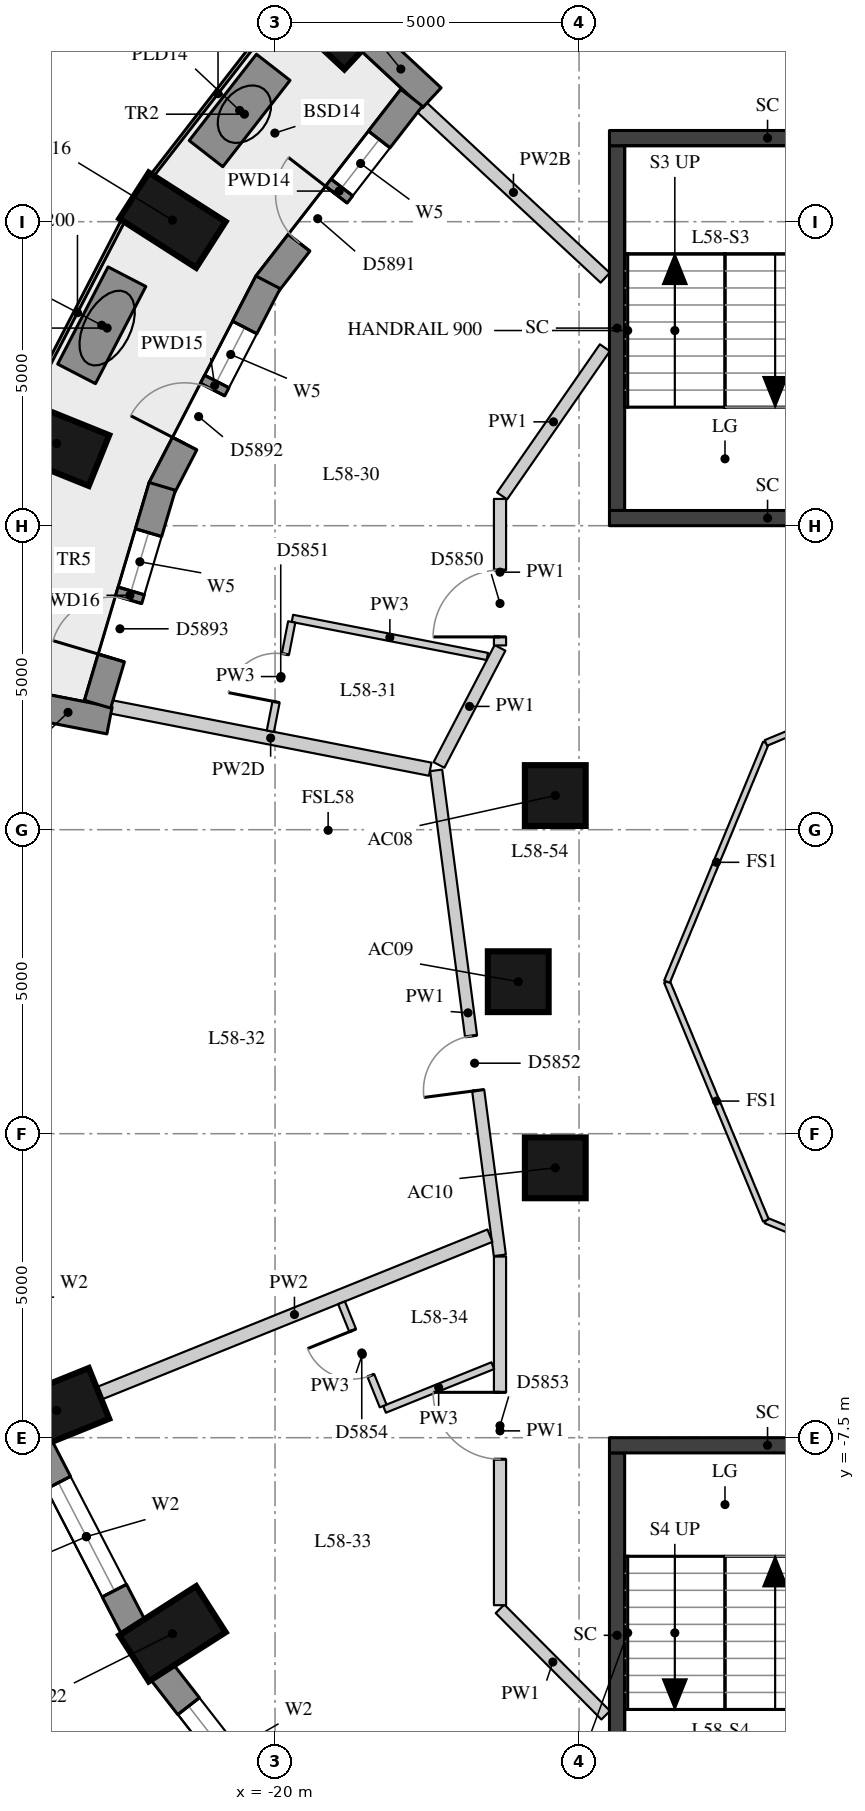
"""IFC4 building model, lengths in metres.
Left out: names, types, materials, properties, quantities, classifications, styles, units other than length and angle.
Written with IfcOpenShell. Run it as: python <this file> out.ifc"""

import sys

from ifc_helpers import new_model, si_unit, direction, frame, frame_2d, origin, origin_2d, place, context, subcontext, project, spatial, rectangle, extrude, element, fill, save


model = new_model("IFC4")
c1 = context("Model", 3, precision=1e-05, world=origin(), true_north=direction((0.0, 1.0)))
c2 = subcontext(c1, "Body", "Model", "MODEL_VIEW")
j1 = project(units=[si_unit("LENGTHUNIT", "METRE"), si_unit("PLANEANGLEUNIT", "RADIAN")], contexts=[c1])
p1 = place(None, origin())
s1 = spatial("IfcSite", under=j1, at=p1, CompositionType="ELEMENT")
p2 = place(p1, origin())
s2 = spatial("IfcBuilding", under=s1, at=p2, CompositionType="ELEMENT")
p3 = place(p2, frame((0.0, 0.0, 205.7)))
s3 = spatial("IfcBuildingStorey", under=s2, at=p3, CompositionType="ELEMENT", Elevation=205.7)
for number, where, z_axis, x_axis in (
    (1, (-19.102, 15.845, 0.0), (0.0, 0.0, 1.0), (-0.732, 0.681, 0.0)),
    (2, (-21.687, 12.525, 0.0), (0.0, 0.0, 1.0), (-0.842, 0.539, 0.0)),
    (3, (-23.591, 8.852, 0.0), (0.0, 0.0, 1.0), (-0.927, 0.374, 0.0)),
    (4, (-23.591, -7.052, 0.0), (0.0, 0.0, 1.0), (-0.927, -0.374, 0.0)),
    (5, (-21.687, -10.725, 0.0), (0.0, 0.0, 1.0), (-0.842, -0.539, 0.0)),
):
    element("IfcColumn", number, at=place(p3, frame(where, z_axis=z_axis, x_axis=x_axis)), inside=s3, PredefinedType="COLUMN", context=c2, shape_type="SweptSolid", body=[
        extrude(rectangle(XDim=1.5, YDim=0.9, at=origin_2d()), origin(), (0.0, 0.0, 1.0), 3.3),
    ])
for number, where, z_axis, x_axis in (
    (6, (-15.391, 3.062, 0.0), (0.0, 0.0, 1.0), (1.0, 0.0, 0.0)),
    (7, (-16.0, 0.0, 0.0), (0.0, 0.0, 1.0), (1.0, 0.0, 0.0)),
    (8, (-15.391, -3.062, 0.0), (0.0, 0.0, 1.0), (1.0, 0.0, 0.0)),
):
    element("IfcColumn", number, at=place(p3, frame(where, z_axis=z_axis, x_axis=x_axis)), inside=s3, PredefinedType="COLUMN", context=c2, shape_type="SweptSolid", body=[
        extrude(rectangle(XDim=1.0, YDim=1.0, at=origin_2d()), origin(), (0.0, 0.0, 1.0), 3.3),
    ])
p4 = place(p3, frame((-23.878, -7.632, 0.0), z_axis=(0.0, 0.0, 1.0), x_axis=(0.460232593174, -0.887798378113, 0.0)))
e9 = element("IfcWall", 9, at=p4, inside=s3, PredefinedType="SOLIDWALL", context=c2, shape_type="SweptSolid", body=[
    extrude(rectangle(XDim=3.371, YDim=0.45, at=frame_2d((1.685, 0.0))), origin(), (0.0, 0.0, 1.0), 3.02),
])
p5 = place(p4, frame((0.685, 0.0, 0.4)))
e10 = element("IfcOpeningElement", 10, at=p5, cuts=e9, PredefinedType="OPENING", context=c2, shape_type="SweptSolid", body=[
    extrude(rectangle(XDim=2.0, YDim=1.75, at=frame_2d((1.0, 0.875))), frame((0.0, 0.235, 0.0), z_axis=(0.0, -1.0, 0.0), x_axis=(1.0, 0.0, 0.0)), (0.0, 0.0, 1.0), 0.47),
])
p6 = place(p3, frame((-21.863, -11.348, 0.0), z_axis=(0.0, 0.0, 1.0), x_axis=(0.614255239631, -0.789107407509, 0.0)))
e11 = element("IfcWall", 11, at=p6, inside=s3, PredefinedType="SOLIDWALL", context=c2, shape_type="SweptSolid", body=[
    extrude(rectangle(XDim=3.438, YDim=0.45, at=frame_2d((1.719, 0.0))), origin(), (0.0, 0.0, 1.0), 3.02),
])
p7 = place(p6, frame((0.719, 0.0, 0.4)))
e12 = element("IfcOpeningElement", 12, at=p7, cuts=e11, PredefinedType="OPENING", context=c2, shape_type="SweptSolid", body=[
    extrude(rectangle(XDim=2.0, YDim=1.75, at=frame_2d((1.0, 0.875))), frame((0.0, 0.235, 0.0), z_axis=(0.0, -1.0, 0.0), x_axis=(1.0, 0.0, 0.0)), (0.0, 0.0, 1.0), 0.47),
])
p8 = place(p3, frame((-18.44, 15.484, 0.0), z_axis=(0.0, 0.0, 1.0), x_axis=(0.732268156969, -0.681016406769, 0.0)))
e13 = element("IfcWall", 13, at=p8, inside=s3, PredefinedType="SOLIDWALL", context=c2, shape_type="SweptSolid", body=[
    extrude(rectangle(XDim=1.391, YDim=0.45, at=frame_2d((0.695, 0.0))), origin(), (0.0, 0.0, 1.0), 2.57),
])
p9 = place(p3, frame((-24.087, 4.563, 0.0), z_axis=(0.0, 0.0, 1.0), x_axis=(0.98143579878, -0.191790961394, 0.0)))
e14 = element("IfcWall", 14, at=p9, inside=s3, PredefinedType="SOLIDWALL", context=c2, shape_type="SweptSolid", body=[
    extrude(rectangle(XDim=1.39, YDim=0.45, at=frame_2d((0.695, 0.0))), origin(), (0.0, 0.0, 1.0), 2.47),
])
p10 = place(p3, frame((-17.754, 14.539, 0.0), z_axis=(0.0, 0.0, 1.0), x_axis=(-0.613174901215, -0.789947175779, 0.0)))
e15 = element("IfcWall", 15, at=p10, inside=s3, PredefinedType="SOLIDWALL", context=c2, shape_type="SweptSolid", body=[
    extrude(rectangle(XDim=3.886, YDim=0.45, at=frame_2d((1.943, 0.0))), origin(), (0.0, 0.0, 1.0), 3.02),
])
p11 = place(p10, frame((0.868, 0.0, 0.4)))
e16 = element("IfcOpeningElement", 16, at=p11, cuts=e15, PredefinedType="OPENING", context=c2, shape_type="SweptSolid", body=[
    extrude(rectangle(XDim=1.0, YDim=1.75, at=frame_2d((0.5, 0.875))), frame((0.0, 0.235, 0.0), z_axis=(0.0, -1.0, 0.0), x_axis=(1.0, 0.0, 0.0)), (0.0, 0.0, 1.0), 0.47),
])
p12 = place(p10, frame((2.018, 0.0, 0.0)))
e17 = element("IfcOpeningElement", 17, at=p12, cuts=e15, PredefinedType="OPENING", context=c2, shape_type="SweptSolid", body=[
    extrude(rectangle(XDim=1.0, YDim=2.15, at=frame_2d((0.5, 1.075))), frame((0.0, 0.235, 0.0), z_axis=(0.0, -1.0, 0.0), x_axis=(1.0, 0.0, 0.0)), (0.0, 0.0, 1.0), 0.47),
])
p13 = place(p3, frame((-20.115, 11.503, 0.0), z_axis=(0.0, 0.0, 1.0), x_axis=(-0.459205720451, -0.888329953511, 0.0)))
e18 = element("IfcWall", 18, at=p13, inside=s3, PredefinedType="SOLIDWALL", context=c2, shape_type="SweptSolid", body=[
    extrude(rectangle(XDim=3.823, YDim=0.45, at=frame_2d((1.911, 0.0))), origin(), (0.0, 0.0, 1.0), 3.02),
])
p14 = place(p13, frame((0.836, 0.0, 0.4)))
e19 = element("IfcOpeningElement", 19, at=p14, cuts=e18, PredefinedType="OPENING", context=c2, shape_type="SweptSolid", body=[
    extrude(rectangle(XDim=1.0, YDim=1.75, at=frame_2d((0.5, 0.875))), frame((0.0, 0.235, 0.0), z_axis=(0.0, -1.0, 0.0), x_axis=(1.0, 0.0, 0.0)), (0.0, 0.0, 1.0), 0.47),
])
p15 = place(p13, frame((1.986, 0.0, 0.0)))
e20 = element("IfcOpeningElement", 20, at=p15, cuts=e18, PredefinedType="OPENING", context=c2, shape_type="SweptSolid", body=[
    extrude(rectangle(XDim=1.0, YDim=2.15, at=frame_2d((0.5, 1.075))), frame((0.0, 0.235, 0.0), z_axis=(0.0, -1.0, 0.0), x_axis=(1.0, 0.0, 0.0)), (0.0, 0.0, 1.0), 0.47),
])
p16 = place(p3, frame((-21.854, 8.146, 0.0), z_axis=(0.0, 0.0, 1.0), x_axis=(-0.284757753004, -0.958599510799, 0.0)))
e21 = element("IfcWall", 21, at=p16, inside=s3, PredefinedType="SOLIDWALL", context=c2, shape_type="SweptSolid", body=[
    extrude(rectangle(XDim=3.737, YDim=0.45, at=frame_2d((1.869, 0.0))), origin(), (0.0, 0.0, 1.0), 3.02),
])
p17 = place(p16, frame((0.794, 0.0, 0.4)))
e22 = element("IfcOpeningElement", 22, at=p17, cuts=e21, PredefinedType="OPENING", context=c2, shape_type="SweptSolid", body=[
    extrude(rectangle(XDim=1.0, YDim=1.75, at=frame_2d((0.5, 0.875))), frame((0.0, 0.235, 0.0), z_axis=(0.0, -1.0, 0.0), x_axis=(1.0, 0.0, 0.0)), (0.0, 0.0, 1.0), 0.47),
])
p18 = place(p16, frame((1.944, 0.0, 0.0)))
e23 = element("IfcOpeningElement", 23, at=p18, cuts=e21, PredefinedType="OPENING", context=c2, shape_type="SweptSolid", body=[
    extrude(rectangle(XDim=1.0, YDim=2.15, at=frame_2d((0.5, 1.075))), frame((0.0, 0.235, 0.0), z_axis=(0.0, -1.0, 0.0), x_axis=(1.0, 0.0, 0.0)), (0.0, 0.0, 1.0), 0.47),
])
for number, where, z_axis, x_axis in (
    (24, (-20.03, 15.04, 0.0), (0.0, 0.0, 1.0), (-0.614, -0.789, 0.0)),
    (25, (-22.436, 11.595, 0.0), (0.0, 0.0, 1.0), (-0.46, -0.888, 0.0)),
):
    element("IfcWall", number, at=place(p3, frame(where, z_axis=z_axis, x_axis=x_axis)), inside=s3, PredefinedType="USERDEFINED", context=c2, shape_type="SweptSolid", body=[
        extrude(rectangle(XDim=1.8, YDim=0.7, at=frame_2d((0.9, 0.0))), origin(), (0.0, 0.0, 1.0), 0.75),
    ])
p19 = place(p3, frame((-14.375, 7.75, -0.28), z_axis=(0.0, 0.0, 1.0), x_axis=(0.0, 1.0, 0.0)))
e26 = element("IfcWall", 26, at=p19, inside=s3, PredefinedType="SHEAR", context=c2, shape_type="SweptSolid", body=[
    extrude(rectangle(XDim=6.0, YDim=0.25, at=frame_2d((3.0, 0.0))), origin(), (0.0, 0.0, 1.0), 3.3),
])
for number, where, z_axis, x_axis in (
    (27, (-14.5, 13.875, -0.28), (0.0, 0.0, 1.0), (1.0, 0.0, 0.0)),
    (28, (-14.5, 7.625, -0.28), (0.0, 0.0, 1.0), (1.0, 0.0, 0.0)),
):
    element("IfcWall", number, at=place(p3, frame(where, z_axis=z_axis, x_axis=x_axis)), inside=s3, PredefinedType="SHEAR", context=c2, shape_type="SweptSolid", body=[
        extrude(rectangle(XDim=5.2, YDim=0.25, at=frame_2d((2.6, 0.0))), origin(), (0.0, 0.0, 1.0), 3.3),
    ])
p20 = place(p3, frame((-14.375, -13.75, -0.28), z_axis=(0.0, 0.0, 1.0), x_axis=(0.0, 1.0, 0.0)))
e29 = element("IfcWall", 29, at=p20, inside=s3, PredefinedType="SHEAR", context=c2, shape_type="SweptSolid", body=[
    extrude(rectangle(XDim=6.0, YDim=0.25, at=frame_2d((3.0, 0.0))), origin(), (0.0, 0.0, 1.0), 3.3),
])
p21 = place(p3, frame((-14.5, -7.625, -0.28), z_axis=(0.0, 0.0, 1.0), x_axis=(1.0, 0.0, 0.0)))
e30 = element("IfcWall", 30, at=p21, inside=s3, PredefinedType="SHEAR", context=c2, shape_type="SweptSolid", body=[
    extrude(rectangle(XDim=5.2, YDim=0.25, at=frame_2d((2.6, 0.0))), origin(), (0.0, 0.0, 1.0), 3.3),
])
p22 = place(p3, frame((-14.562, -12.064, 0.0), z_axis=(0.0, 0.0, 1.0), x_axis=(-0.704826289083, 0.709379942074, 0.0)))
e31 = element("IfcWall", 31, at=p22, inside=s3, PredefinedType="PARTITIONING", context=c2, shape_type="SweptSolid", body=[
    extrude(rectangle(XDim=2.466, YDim=0.2, at=frame_2d((1.233, 0.0))), origin(), (0.0, 0.0, 1.0), 3.02),
])
p23 = place(p3, frame((-16.3, -10.255, 0.0), z_axis=(0.0, 0.0, 1.0), x_axis=(0.0, 1.0, 0.0)))
e32 = element("IfcWall", 32, at=p23, inside=s3, PredefinedType="PARTITIONING", context=c2, shape_type="SweptSolid", body=[
    extrude(rectangle(XDim=5.734, YDim=0.2, at=frame_2d((2.867, 0.0))), origin(), (0.0, 0.0, 1.0), 3.02),
])
p24 = place(p23, frame((2.401, 0.0, 0.0)))
e33 = element("IfcOpeningElement", 33, at=p24, cuts=e32, PredefinedType="OPENING", context=c2, shape_type="SweptSolid", body=[
    extrude(rectangle(XDim=1.1, YDim=2.1, at=frame_2d((0.55, 1.05))), frame((0.0, 0.11, 0.0), z_axis=(0.0, -1.0, 0.0), x_axis=(1.0, 0.0, 0.0)), (0.0, 0.0, 1.0), 0.22),
])
p25 = place(p3, frame((-16.303, -4.501, 0.0), z_axis=(0.0, 0.0, 1.0), x_axis=(-0.130191522351, 0.991488864036, 0.0)))
e34 = element("IfcWall", 34, at=p25, inside=s3, PredefinedType="PARTITIONING", context=c2, shape_type="SweptSolid", body=[
    extrude(rectangle(XDim=8.045, YDim=0.2, at=frame_2d((4.022, 0.0))), origin(), (0.0, 0.0, 1.0), 3.02),
])
p26 = place(p25, frame((2.738, 0.0, 0.0)))
e35 = element("IfcOpeningElement", 35, at=p26, cuts=e34, PredefinedType="OPENING", context=c2, shape_type="SweptSolid", body=[
    extrude(rectangle(XDim=0.9, YDim=2.1, at=frame_2d((0.45, 1.05))), frame((0.0, 0.11, 0.0), z_axis=(0.0, -1.0, 0.0), x_axis=(1.0, 0.0, 0.0)), (0.0, 0.0, 1.0), 0.22),
])
p27 = place(p3, frame((-17.304, 3.565, 0.0), z_axis=(0.0, 0.0, 1.0), x_axis=(0.46212415324, 0.886815238363, 0.0)))
e36 = element("IfcWall", 36, at=p27, inside=s3, PredefinedType="PARTITIONING", context=c2, shape_type="SweptSolid", body=[
    extrude(rectangle(XDim=2.172, YDim=0.2, at=frame_2d((1.086, 0.0))), origin(), (0.0, 0.0, 1.0), 3.02),
])
p28 = place(p3, frame((-16.3, 5.531, 0.0), z_axis=(0.0, 0.0, 1.0), x_axis=(0.0, 1.0, 0.0)))
e37 = element("IfcWall", 37, at=p28, inside=s3, PredefinedType="PARTITIONING", context=c2, shape_type="SweptSolid", body=[
    extrude(rectangle(XDim=2.409, YDim=0.2, at=frame_2d((1.205, 0.0))), origin(), (0.0, 0.0, 1.0), 3.02),
])
p29 = place(p28, frame((0.14, 0.0, 0.0)))
e38 = element("IfcOpeningElement", 38, at=p29, cuts=e37, PredefinedType="OPENING", context=c2, shape_type="SweptSolid", body=[
    extrude(rectangle(XDim=1.1, YDim=2.1, at=frame_2d((0.55, 1.05))), frame((0.0, 0.11, 0.0), z_axis=(0.0, -1.0, 0.0), x_axis=(1.0, 0.0, 0.0)), (0.0, 0.0, 1.0), 0.22),
])
p30 = place(p3, frame((-16.266, 7.989, 0.0), z_axis=(0.0, 0.0, 1.0), x_axis=(0.569860411146, 0.821741511552, 0.0)))
e39 = element("IfcWall", 39, at=p30, inside=s3, PredefinedType="PARTITIONING", context=c2, shape_type="SweptSolid", body=[
    extrude(rectangle(XDim=2.966, YDim=0.2, at=frame_2d((1.483, 0.0))), origin(), (0.0, 0.0, 1.0), 3.02),
])
p31 = place(p3, frame((-17.588, 14.385, 0.0), z_axis=(0.0, 0.0, 1.0), x_axis=(0.732259547802, -0.681025663725, 0.0)))
e40 = element("IfcWall", 40, at=p31, inside=s3, PredefinedType="PARTITIONING", context=c2, shape_type="SweptSolid", body=[
    extrude(rectangle(XDim=4.122, YDim=0.22, at=frame_2d((2.061, 0.0))), origin(), (0.0, 0.0, 1.0), 2.57),
])
p32 = place(p3, frame((-22.697, 4.521, 0.0), z_axis=(0.0, 0.0, 1.0), x_axis=(0.981448712972, -0.19172486486, 0.0)))
e41 = element("IfcWall", 41, at=p32, inside=s3, PredefinedType="PARTITIONING", context=c2, shape_type="SweptSolid", body=[
    extrude(rectangle(XDim=5.348, YDim=0.22, at=frame_2d((2.674, 0.0))), origin(), (0.0, 0.0, 1.0), 2.47),
])
p33 = place(p3, frame((-22.896, -6.771, 0.0), z_axis=(0.0, 0.0, 1.0), x_axis=(0.927377440276, 0.374127095073, 0.0)))
e42 = element("IfcWall", 42, at=p33, inside=s3, PredefinedType="PARTITIONING", context=c2, shape_type="SweptSolid", body=[
    extrude(rectangle(XDim=6.933, YDim=0.22, at=frame_2d((3.467, 0.0))), origin(), (0.0, 0.0, 1.0), 3.02),
])
p34 = place(p3, frame((-16.508, 5.349, 0.0), z_axis=(0.0, 0.0, 1.0), x_axis=(-0.981441910277, 0.191759684898, 0.0)))
e43 = element("IfcWall", 43, at=p34, inside=s3, PredefinedType="PARTITIONING", context=c2, shape_type="SweptSolid", body=[
    extrude(rectangle(XDim=3.267, YDim=0.12, at=frame_2d((1.633, 0.0))), origin(), (0.0, 0.0, 1.0), 3.02),
])
p35 = place(p3, frame((-16.419, -6.315, 0.0), z_axis=(0.0, 0.0, 1.0), x_axis=(-0.927358946461, -0.374172933841, 0.0)))
e44 = element("IfcWall", 44, at=p35, inside=s3, PredefinedType="PARTITIONING", context=c2, shape_type="SweptSolid", body=[
    extrude(rectangle(XDim=1.92, YDim=0.12, at=frame_2d((0.96, 0.0))), origin(), (0.0, 0.0, 1.0), 3.02),
])
p36 = place(p3, frame((-19.726, 5.917, 0.0), z_axis=(0.0, 0.0, 1.0), x_axis=(-0.191830051998, -0.981428158935, 0.0)))
e45 = element("IfcWall", 45, at=p36, inside=s3, PredefinedType="PARTITIONING", context=c2, shape_type="SweptSolid", body=[
    extrude(rectangle(XDim=1.83, YDim=0.12, at=frame_2d((0.915, 0.0))), origin(), (0.0, 0.0, 1.0), 3.02),
])
p37 = place(p36, frame((0.54, 0.0, 0.0)))
e46 = element("IfcOpeningElement", 46, at=p37, cuts=e45, PredefinedType="OPENING", context=c2, shape_type="SweptSolid", body=[
    extrude(rectangle(XDim=0.8, YDim=2.1, at=frame_2d((0.4, 1.05))), frame((0.0, 0.07, 0.0), z_axis=(0.0, -1.0, 0.0), x_axis=(1.0, 0.0, 0.0)), (0.0, 0.0, 1.0), 0.14),
])
p38 = place(p3, frame((-18.222, -6.978, 0.0), z_axis=(0.0, 0.0, 1.0), x_axis=(-0.374218187905, 0.927340685963, 0.0)))
e47 = element("IfcWall", 47, at=p38, inside=s3, PredefinedType="PARTITIONING", context=c2, shape_type="SweptSolid", body=[
    extrude(rectangle(XDim=1.83, YDim=0.12, at=frame_2d((0.915, 0.0))), origin(), (0.0, 0.0, 1.0), 3.02),
])
p39 = place(p38, frame((0.54, 0.0, 0.0)))
e48 = element("IfcOpeningElement", 48, at=p39, cuts=e47, PredefinedType="OPENING", context=c2, shape_type="SweptSolid", body=[
    extrude(rectangle(XDim=0.8, YDim=2.1, at=frame_2d((0.4, 1.05))), frame((0.0, 0.07, 0.0), z_axis=(0.0, -1.0, 0.0), x_axis=(1.0, 0.0, 0.0)), (0.0, 0.0, 1.0), 0.14),
])
for number, where, z_axis, x_axis in (
    (49, (-8.0, -5.554, 0.0), (0.0, 0.0, 1.0), (-0.924, 0.383, 0.0)),
    (50, (-11.927, -3.927, 0.0), (0.0, 0.0, 1.0), (-0.383, 0.924, 0.0)),
    (51, (-13.554, 0.0, 0.0), (0.0, 0.0, 1.0), (0.383, 0.924, 0.0)),
    (52, (-11.927, 3.927, 0.0), (0.0, 0.0, 1.0), (0.924, 0.383, 0.0)),
):
    element("IfcWall", number, at=place(p3, frame(where, z_axis=z_axis, x_axis=x_axis)), inside=s3, PredefinedType="PARTITIONING", context=c2, shape_type="SweptSolid", body=[
        extrude(rectangle(XDim=4.251, YDim=0.1, at=frame_2d((2.125, 0.0))), origin(), (0.0, 0.0, 1.0), 3.02),
    ])
p40 = place(p5, origin())
e53 = element("IfcWindow", 53, at=p40, inside=s3, PartitioningType="SINGLE_PANEL", PredefinedType="WINDOW", context=c2, shape_type="SweptSolid", body=[
    extrude(rectangle(XDim=2.0, YDim=1.75, at=frame_2d((1.0, 0.875))), frame((0.0, 0.035, 0.0), z_axis=(0.0, -1.0, 0.0), x_axis=(1.0, 0.0, 0.0)), (0.0, 0.0, 1.0), 0.06),
])
fill(e10, e53)
p41 = place(p7, origin())
e54 = element("IfcWindow", 54, at=p41, inside=s3, PartitioningType="SINGLE_PANEL", PredefinedType="WINDOW", context=c2, shape_type="SweptSolid", body=[
    extrude(rectangle(XDim=2.0, YDim=1.75, at=frame_2d((1.0, 0.875))), frame((0.0, 0.035, 0.0), z_axis=(0.0, -1.0, 0.0), x_axis=(1.0, 0.0, 0.0)), (0.0, 0.0, 1.0), 0.06),
])
fill(e12, e54)
p42 = place(p11, origin())
e55 = element("IfcWindow", 55, at=p42, inside=s3, PartitioningType="SINGLE_PANEL", PredefinedType="WINDOW", context=c2, shape_type="SweptSolid", body=[
    extrude(rectangle(XDim=1.0, YDim=1.75, at=frame_2d((0.5, 0.875))), frame((0.0, 0.035, 0.0), z_axis=(0.0, -1.0, 0.0), x_axis=(1.0, 0.0, 0.0)), (0.0, 0.0, 1.0), 0.06),
])
fill(e16, e55)
p43 = place(p12, frame((1.0, 0.0, 0.0), z_axis=(0.0, 0.0, 1.0), x_axis=(-1.0, 0.0, 0.0)))
e56 = element("IfcDoor", 56, at=p43, inside=s3, OperationType="SINGLE_SWING_RIGHT", PredefinedType="DOOR", context=c2, shape_type="SweptSolid", body=[
    extrude(rectangle(XDim=1.0, YDim=2.15, at=frame_2d((0.5, 1.075))), frame((0.0, 0.075, 0.0), z_axis=(0.0, -1.0, 0.0), x_axis=(1.0, 0.0, 0.0)), (0.0, 0.0, 1.0), 0.05),
])
fill(e17, e56)
p44 = place(p14, origin())
e57 = element("IfcWindow", 57, at=p44, inside=s3, PartitioningType="SINGLE_PANEL", PredefinedType="WINDOW", context=c2, shape_type="SweptSolid", body=[
    extrude(rectangle(XDim=1.0, YDim=1.75, at=frame_2d((0.5, 0.875))), frame((0.0, 0.035, 0.0), z_axis=(0.0, -1.0, 0.0), x_axis=(1.0, 0.0, 0.0)), (0.0, 0.0, 1.0), 0.06),
])
fill(e19, e57)
p45 = place(p15, frame((1.0, 0.0, 0.0), z_axis=(0.0, 0.0, 1.0), x_axis=(-1.0, 0.0, 0.0)))
e58 = element("IfcDoor", 58, at=p45, inside=s3, OperationType="SINGLE_SWING_LEFT", PredefinedType="DOOR", context=c2, shape_type="SweptSolid", body=[
    extrude(rectangle(XDim=1.0, YDim=2.15, at=frame_2d((0.5, 1.075))), frame((0.0, 0.075, 0.0), z_axis=(0.0, -1.0, 0.0), x_axis=(1.0, 0.0, 0.0)), (0.0, 0.0, 1.0), 0.05),
])
fill(e20, e58)
p46 = place(p17, origin())
e59 = element("IfcWindow", 59, at=p46, inside=s3, PartitioningType="SINGLE_PANEL", PredefinedType="WINDOW", context=c2, shape_type="SweptSolid", body=[
    extrude(rectangle(XDim=1.0, YDim=1.75, at=frame_2d((0.5, 0.875))), frame((0.0, 0.035, 0.0), z_axis=(0.0, -1.0, 0.0), x_axis=(1.0, 0.0, 0.0)), (0.0, 0.0, 1.0), 0.06),
])
fill(e22, e59)
p47 = place(p18, frame((1.0, 0.0, 0.0), z_axis=(0.0, 0.0, 1.0), x_axis=(-1.0, 0.0, 0.0)))
e60 = element("IfcDoor", 60, at=p47, inside=s3, OperationType="SINGLE_SWING_LEFT", PredefinedType="DOOR", context=c2, shape_type="SweptSolid", body=[
    extrude(rectangle(XDim=1.0, YDim=2.15, at=frame_2d((0.5, 1.075))), frame((0.0, 0.075, 0.0), z_axis=(0.0, -1.0, 0.0), x_axis=(1.0, 0.0, 0.0)), (0.0, 0.0, 1.0), 0.05),
])
fill(e23, e60)
p48 = place(p29, origin())
e61 = element("IfcDoor", 61, at=p48, inside=s3, OperationType="SINGLE_SWING_LEFT", PredefinedType="DOOR", context=c2, shape_type="SweptSolid", body=[
    extrude(rectangle(XDim=1.1, YDim=2.1, at=frame_2d((0.55, 1.05))), frame((0.0, 0.025, 0.0), z_axis=(0.0, -1.0, 0.0), x_axis=(1.0, 0.0, 0.0)), (0.0, 0.0, 1.0), 0.05),
])
fill(e38, e61)
p49 = place(p37, origin())
e62 = element("IfcDoor", 62, at=p49, inside=s3, OperationType="SINGLE_SWING_LEFT", PredefinedType="DOOR", context=c2, shape_type="SweptSolid", body=[
    extrude(rectangle(XDim=0.8, YDim=2.1, at=frame_2d((0.4, 1.05))), frame((0.0, 0.025, 0.0), z_axis=(0.0, -1.0, 0.0), x_axis=(1.0, 0.0, 0.0)), (0.0, 0.0, 1.0), 0.05),
])
fill(e46, e62)
p50 = place(p26, origin())
e63 = element("IfcDoor", 63, at=p50, inside=s3, OperationType="SINGLE_SWING_LEFT", PredefinedType="DOOR", context=c2, shape_type="SweptSolid", body=[
    extrude(rectangle(XDim=0.9, YDim=2.1, at=frame_2d((0.45, 1.05))), frame((0.0, 0.025, 0.0), z_axis=(0.0, -1.0, 0.0), x_axis=(1.0, 0.0, 0.0)), (0.0, 0.0, 1.0), 0.05),
])
fill(e35, e63)
p51 = place(p24, origin())
e64 = element("IfcDoor", 64, at=p51, inside=s3, OperationType="SINGLE_SWING_RIGHT", PredefinedType="DOOR", context=c2, shape_type="SweptSolid", body=[
    extrude(rectangle(XDim=1.1, YDim=2.1, at=frame_2d((0.55, 1.05))), frame((0.0, 0.025, 0.0), z_axis=(0.0, -1.0, 0.0), x_axis=(1.0, 0.0, 0.0)), (0.0, 0.0, 1.0), 0.05),
])
fill(e33, e64)
p52 = place(p39, origin())
e65 = element("IfcDoor", 65, at=p52, inside=s3, OperationType="SINGLE_SWING_RIGHT", PredefinedType="DOOR", context=c2, shape_type="SweptSolid", body=[
    extrude(rectangle(XDim=0.8, YDim=2.1, at=frame_2d((0.4, 1.05))), frame((0.0, 0.025, 0.0), z_axis=(0.0, -1.0, 0.0), x_axis=(1.0, 0.0, 0.0)), (0.0, 0.0, 1.0), 0.05),
])
fill(e48, e65)
save(model, sys.argv[1])
